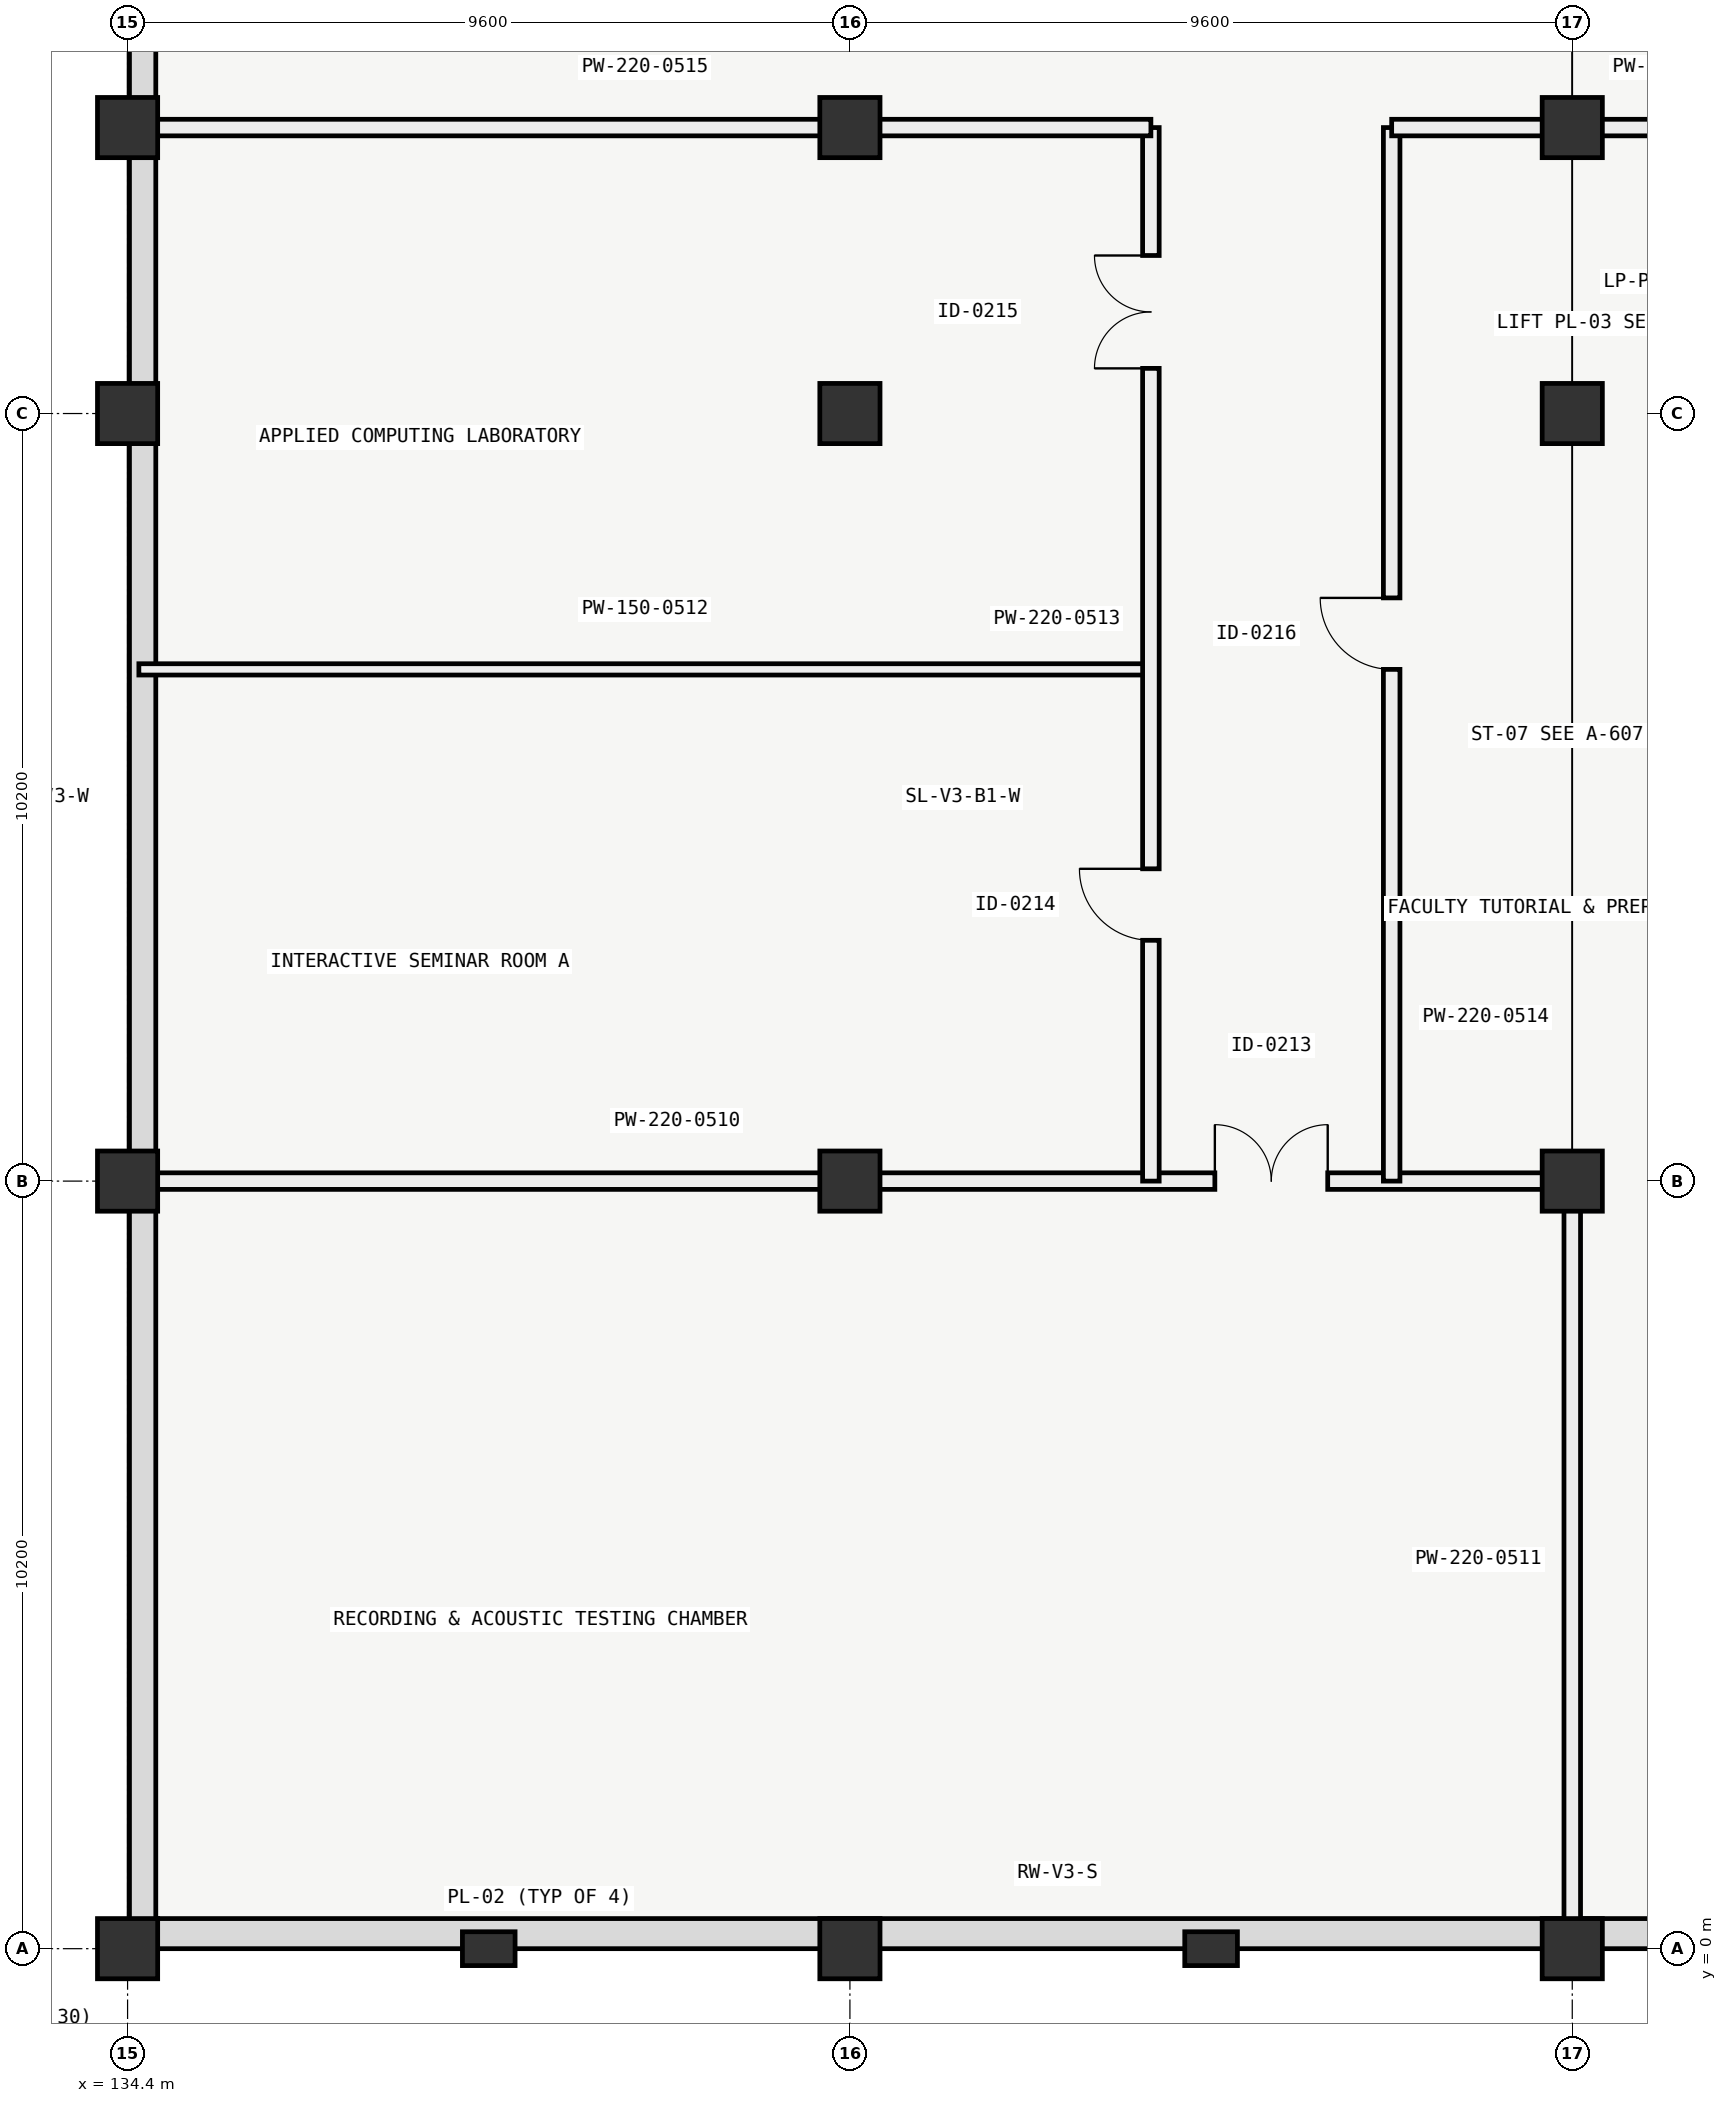
"""IFC4 building model, lengths in metres.
Left out: names, types, materials, properties, quantities, classifications, styles, units other than length and angle.
Written with IfcOpenShell. Run it as: python <this file> out.ifc"""

import sys

from ifc_helpers import new_model, si_unit, direction, frame, frame_2d, origin, origin_2d, place, context, subcontext, project, spatial, rectangle, extrude, element, fill, save


model = new_model("IFC4")
c1 = context("Model", 3, precision=1e-05, world=origin(), true_north=direction((0.0, 1.0)))
c2 = subcontext(c1, "Body", "Model", "MODEL_VIEW")
j1 = project(units=[si_unit("LENGTHUNIT", "METRE"), si_unit("PLANEANGLEUNIT", "RADIAN")], contexts=[c1])
p1 = place(None, origin())
s1 = spatial("IfcSite", under=j1, at=p1, CompositionType="ELEMENT")
p2 = place(p1, origin())
s2 = spatial("IfcBuilding", under=s1, at=p2, CompositionType="ELEMENT")
p3 = place(p2, frame((0.0, 0.0, -4.2)))
s3 = spatial("IfcBuildingStorey", under=s2, at=p3, CompositionType="ELEMENT", Elevation=-4.2)
for number, where, z_axis, x_axis in (
    (1, (134.4, 0.0, 0.0), (0.0, 0.0, 1.0), (1.0, 0.0, 0.0)),
    (2, (134.4, 10.2, 0.0), (0.0, 0.0, 1.0), (1.0, 0.0, 0.0)),
    (3, (134.4, 20.4, 0.0), (0.0, 0.0, 1.0), (1.0, 0.0, 0.0)),
    (4, (134.4, 24.2, 0.0), (0.0, 0.0, 1.0), (1.0, 0.0, 0.0)),
    (5, (144.0, 0.0, 0.0), (0.0, 0.0, 1.0), (1.0, 0.0, 0.0)),
    (6, (144.0, 10.2, 0.0), (0.0, 0.0, 1.0), (1.0, 0.0, 0.0)),
    (7, (144.0, 20.4, 0.0), (0.0, 0.0, 1.0), (1.0, 0.0, 0.0)),
    (8, (144.0, 24.2, 0.0), (0.0, 0.0, 1.0), (1.0, 0.0, 0.0)),
    (9, (153.6, 0.0, 0.0), (0.0, 0.0, 1.0), (1.0, 0.0, 0.0)),
    (10, (153.6, 10.2, 0.0), (0.0, 0.0, 1.0), (1.0, 0.0, 0.0)),
    (11, (153.6, 20.4, 0.0), (0.0, 0.0, 1.0), (1.0, 0.0, 0.0)),
    (12, (153.6, 24.2, 0.0), (0.0, 0.0, 1.0), (1.0, 0.0, 0.0)),
):
    element("IfcColumn", number, at=place(p3, frame(where, z_axis=z_axis, x_axis=x_axis)), inside=s3, PredefinedType="COLUMN", context=c2, shape_type="SweptSolid", body=[
        extrude(rectangle(XDim=0.8, YDim=0.8, at=origin_2d()), origin(), (0.0, 0.0, 1.0), 4.2),
    ])
for number, where, z_axis, x_axis in (
    (13, (139.2, 0.0, 0.0), (0.0, 0.0, 1.0), (0.0, 1.0, 0.0)),
    (14, (148.8, 0.0, 0.0), (0.0, 0.0, 1.0), (0.0, 1.0, 0.0)),
):
    element("IfcColumn", number, at=place(p3, frame(where, z_axis=z_axis, x_axis=x_axis)), inside=s3, PredefinedType="PILASTER", context=c2, shape_type="SweptSolid", body=[
        extrude(rectangle(XDim=0.45, YDim=0.7, at=origin_2d()), origin(), (0.0, 0.0, 1.0), 4.2),
    ])
p4 = place(p3, frame((134.6, 0.2, 0.0), z_axis=(0.0, 0.0, 1.0), x_axis=(1.0, 0.0, 0.0)))
e15 = element("IfcWall", 15, at=p4, inside=s3, PredefinedType="USERDEFINED", context=c2, shape_type="SweptSolid", body=[
    extrude(rectangle(XDim=38.0, YDim=0.4, at=frame_2d((19.0, 0.0))), origin(), (0.0, 0.0, 1.0), 3.9),
])
p5 = place(p3, frame((134.6, 0.2, 0.0), z_axis=(0.0, 0.0, 1.0), x_axis=(0.0, 1.0, 0.0)))
e16 = element("IfcWall", 16, at=p5, inside=s3, PredefinedType="USERDEFINED", context=c2, shape_type="SweptSolid", body=[
    extrude(rectangle(XDim=30.2, YDim=0.35, at=frame_2d((15.1, 0.0))), origin(), (0.0, 0.0, 1.0), 3.9),
])
p6 = place(p3, frame((134.55, 10.2, 0.0), z_axis=(0.0, 0.0, 1.0), x_axis=(1.0, 0.0, 0.0)))
e17 = element("IfcWall", 17, at=p6, inside=s3, PredefinedType="PARTITIONING", context=c2, shape_type="SweptSolid", body=[
    extrude(rectangle(XDim=19.05, YDim=0.22, at=frame_2d((9.525, 0.0))), origin(), (0.0, 0.0, 1.0), 3.18),
])
p7 = place(p6, frame((14.3, 0.0, 0.0)))
e18 = element("IfcOpeningElement", 18, at=p7, cuts=e17, PredefinedType="OPENING", context=c2, shape_type="SweptSolid", body=[
    extrude(rectangle(XDim=1.5, YDim=2.2, at=frame_2d((0.75, 1.1))), frame((0.0, 0.12, 0.0), z_axis=(0.0, -1.0, 0.0), x_axis=(1.0, 0.0, 0.0)), (0.0, 0.0, 1.0), 0.24),
])
p8 = place(p3, frame((153.6, 0.15, 0.0), z_axis=(0.0, 0.0, 1.0), x_axis=(0.0, 1.0, 0.0)))
e19 = element("IfcWall", 19, at=p8, inside=s3, PredefinedType="PARTITIONING", context=c2, shape_type="SweptSolid", body=[
    extrude(rectangle(XDim=10.05, YDim=0.22, at=frame_2d((5.025, 0.0))), origin(), (0.0, 0.0, 1.0), 3.18),
])
p9 = place(p3, frame((134.55, 17.0, 0.0), z_axis=(0.0, 0.0, 1.0), x_axis=(1.0, 0.0, 0.0)))
e20 = element("IfcWall", 20, at=p9, inside=s3, PredefinedType="PARTITIONING", context=c2, shape_type="SweptSolid", body=[
    extrude(rectangle(XDim=13.45, YDim=0.15, at=frame_2d((6.725, 0.0))), origin(), (0.0, 0.0, 1.0), 3.23),
])
p10 = place(p3, frame((148.0, 10.2, 0.0), z_axis=(0.0, 0.0, 1.0), x_axis=(0.0, 1.0, 0.0)))
e21 = element("IfcWall", 21, at=p10, inside=s3, PredefinedType="PARTITIONING", context=c2, shape_type="SweptSolid", body=[
    extrude(rectangle(XDim=14.0, YDim=0.22, at=frame_2d((7.0, 0.0))), origin(), (0.0, 0.0, 1.0), 3.18),
])
p11 = place(p10, frame((3.2, 0.0, 0.0)))
e22 = element("IfcOpeningElement", 22, at=p11, cuts=e21, PredefinedType="OPENING", context=c2, shape_type="SweptSolid", body=[
    extrude(rectangle(XDim=0.95, YDim=2.1, at=frame_2d((0.475, 1.05))), frame((0.0, 0.12, 0.0), z_axis=(0.0, -1.0, 0.0), x_axis=(1.0, 0.0, 0.0)), (0.0, 0.0, 1.0), 0.24),
])
p12 = place(p10, frame((10.8, 0.0, 0.0)))
e23 = element("IfcOpeningElement", 23, at=p12, cuts=e21, PredefinedType="OPENING", context=c2, shape_type="SweptSolid", body=[
    extrude(rectangle(XDim=1.5, YDim=2.2, at=frame_2d((0.75, 1.1))), frame((0.0, 0.12, 0.0), z_axis=(0.0, -1.0, 0.0), x_axis=(1.0, 0.0, 0.0)), (0.0, 0.0, 1.0), 0.24),
])
p13 = place(p3, frame((151.2, 10.2, 0.0), z_axis=(0.0, 0.0, 1.0), x_axis=(0.0, 1.0, 0.0)))
e24 = element("IfcWall", 24, at=p13, inside=s3, PredefinedType="PARTITIONING", context=c2, shape_type="SweptSolid", body=[
    extrude(rectangle(XDim=14.0, YDim=0.22, at=frame_2d((7.0, 0.0))), origin(), (0.0, 0.0, 1.0), 3.18),
])
p14 = place(p13, frame((6.8, 0.0, 0.0)))
e25 = element("IfcOpeningElement", 25, at=p14, cuts=e24, PredefinedType="OPENING", context=c2, shape_type="SweptSolid", body=[
    extrude(rectangle(XDim=0.95, YDim=2.1, at=frame_2d((0.475, 1.05))), frame((0.0, 0.12, 0.0), z_axis=(0.0, -1.0, 0.0), x_axis=(1.0, 0.0, 0.0)), (0.0, 0.0, 1.0), 0.24),
])
p15 = place(p3, frame((134.55, 24.2, 0.0), z_axis=(0.0, 0.0, 1.0), x_axis=(1.0, 0.0, 0.0)))
e26 = element("IfcWall", 26, at=p15, inside=s3, PredefinedType="PARTITIONING", context=c2, shape_type="SweptSolid", body=[
    extrude(rectangle(XDim=13.45, YDim=0.22, at=frame_2d((6.725, 0.0))), origin(), (0.0, 0.0, 1.0), 3.23),
])
p16 = place(p3, frame((151.2, 24.2, 0.0), z_axis=(0.0, 0.0, 1.0), x_axis=(1.0, 0.0, 0.0)))
e27 = element("IfcWall", 27, at=p16, inside=s3, PredefinedType="PARTITIONING", context=c2, shape_type="SweptSolid", body=[
    extrude(rectangle(XDim=7.55, YDim=0.22, at=frame_2d((3.775, 0.0))), origin(), (0.0, 0.0, 1.0), 3.23),
])
p17 = place(p7, origin())
e28 = element("IfcDoor", 28, at=p17, inside=s3, OperationType="DOUBLE_DOOR_SINGLE_SWING", PredefinedType="DOOR", context=c2, shape_type="SweptSolid", body=[
    extrude(rectangle(XDim=1.5, YDim=2.2, at=frame_2d((0.75, 1.1))), frame((0.0, 0.025, 0.0), z_axis=(0.0, -1.0, 0.0), x_axis=(1.0, 0.0, 0.0)), (0.0, 0.0, 1.0), 0.05),
])
fill(e18, e28)
p18 = place(p11, origin())
e29 = element("IfcDoor", 29, at=p18, inside=s3, OperationType="SINGLE_SWING_RIGHT", PredefinedType="DOOR", context=c2, shape_type="SweptSolid", body=[
    extrude(rectangle(XDim=0.95, YDim=2.1, at=frame_2d((0.475, 1.05))), frame((0.0, 0.025, 0.0), z_axis=(0.0, -1.0, 0.0), x_axis=(1.0, 0.0, 0.0)), (0.0, 0.0, 1.0), 0.05),
])
fill(e22, e29)
p19 = place(p12, origin())
e30 = element("IfcDoor", 30, at=p19, inside=s3, OperationType="DOUBLE_DOOR_SINGLE_SWING", PredefinedType="DOOR", context=c2, shape_type="SweptSolid", body=[
    extrude(rectangle(XDim=1.5, YDim=2.2, at=frame_2d((0.75, 1.1))), frame((0.0, 0.025, 0.0), z_axis=(0.0, -1.0, 0.0), x_axis=(1.0, 0.0, 0.0)), (0.0, 0.0, 1.0), 0.05),
])
fill(e23, e30)
p20 = place(p14, origin())
e31 = element("IfcDoor", 31, at=p20, inside=s3, OperationType="SINGLE_SWING_RIGHT", PredefinedType="DOOR", context=c2, shape_type="SweptSolid", body=[
    extrude(rectangle(XDim=0.95, YDim=2.1, at=frame_2d((0.475, 1.05))), frame((0.0, 0.025, 0.0), z_axis=(0.0, -1.0, 0.0), x_axis=(1.0, 0.0, 0.0)), (0.0, 0.0, 1.0), 0.05),
])
fill(e25, e31)
save(model, sys.argv[1])
